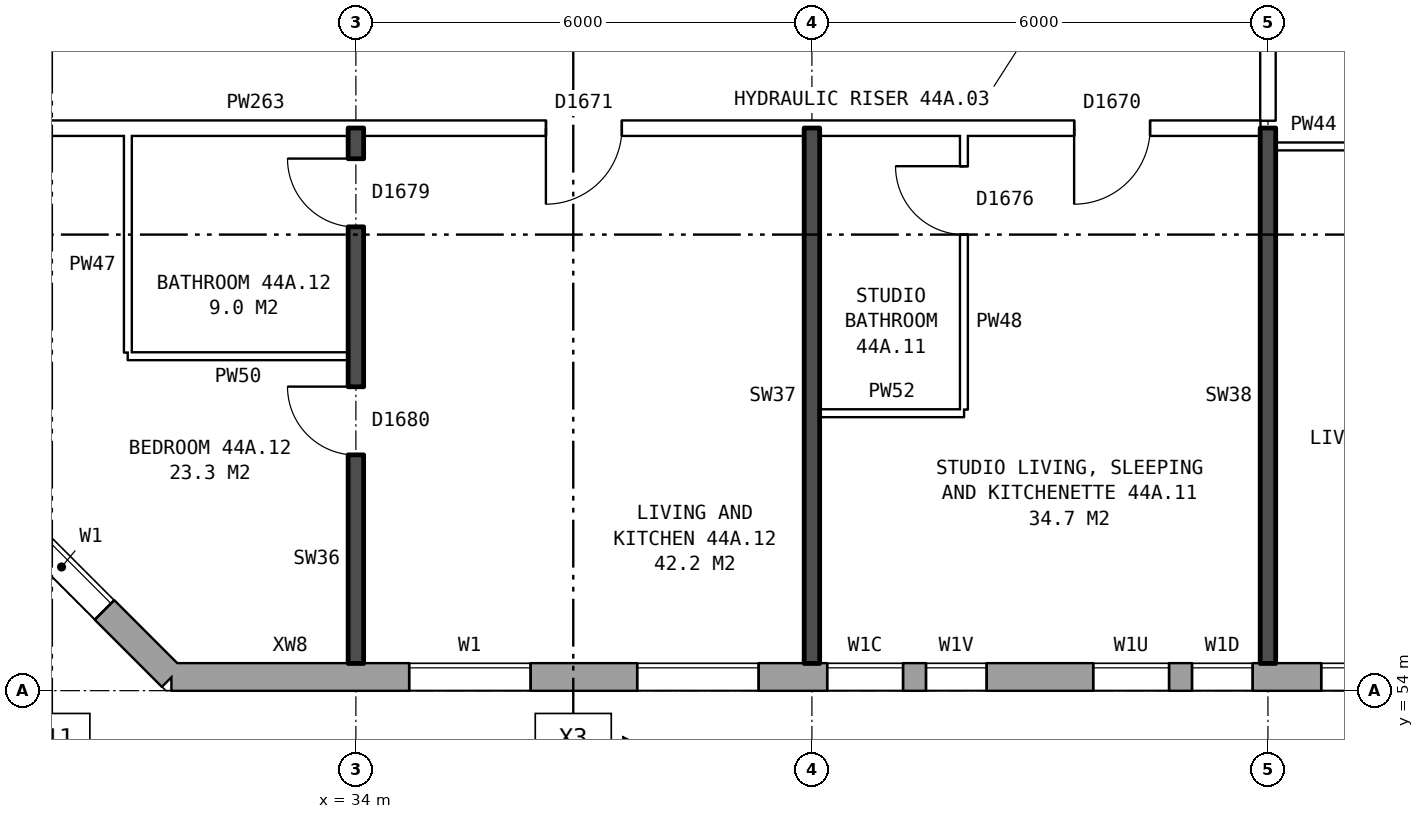
"""IFC4 building model, lengths in metres.
Left out: names, types, materials, properties, quantities, classifications, styles, units other than length and angle.
Written with IfcOpenShell. Run it as: python <this file> out.ifc"""

import sys

from ifc_helpers import new_model, si_unit, direction, frame, frame_2d, origin, place, context, subcontext, project, spatial, rectangle, extrude, element, fill, save


model = new_model("IFC4")
c1 = context("Model", 3, precision=1e-05, world=origin(), true_north=direction((0.0, 1.0)))
c2 = subcontext(c1, "Body", "Model", "MODEL_VIEW")
j1 = project(units=[si_unit("LENGTHUNIT", "METRE"), si_unit("PLANEANGLEUNIT", "RADIAN")], contexts=[c1])
p1 = place(None, origin())
s1 = spatial("IfcSite", under=j1, at=p1, CompositionType="ELEMENT")
p2 = place(p1, origin())
s2 = spatial("IfcBuilding", under=s1, at=p2, CompositionType="ELEMENT")
p3 = place(p2, frame((0.0, 0.0, 157.8)))
s3 = spatial("IfcBuildingStorey", under=s2, at=p3, CompositionType="ELEMENT", Elevation=157.8)
p4 = place(p3, frame((28.68, 57.075, 0.0), z_axis=(0.0, 0.0, 1.0), x_axis=(0.707106781187, -0.707106781187, 0.0)))
e1 = element("IfcWall", 1, at=p4, inside=s3, PredefinedType="STANDARD", context=c2, shape_type="SweptSolid", body=[
    extrude(rectangle(XDim=4.094, YDim=0.36, at=frame_2d((2.047, 0.0))), origin(), (0.0, 0.0, 1.0), 2.85),
])
p5 = place(p4, frame((1.247, 0.0, 0.8)))
e2 = element("IfcOpeningElement", 2, at=p5, cuts=e1, PredefinedType="OPENING", context=c2, shape_type="SweptSolid", body=[
    extrude(rectangle(XDim=1.6, YDim=1.8, at=frame_2d((0.8, 0.9))), frame((0.0, 0.19, 0.0), z_axis=(0.0, -1.0, 0.0), x_axis=(1.0, 0.0, 0.0)), (0.0, 0.0, 1.0), 0.38),
])
p6 = place(p3, frame((31.575, 54.18, 0.0), z_axis=(0.0, 0.0, 1.0), x_axis=(1.0, 0.0, 0.0)))
e3 = element("IfcWall", 3, at=p6, inside=s3, PredefinedType="STANDARD", context=c2, shape_type="SweptSolid", body=[
    extrude(rectangle(XDim=41.351, YDim=0.36, at=frame_2d((20.675, 0.0))), origin(), (0.0, 0.0, 1.0), 2.85),
])
p7 = place(p6, frame((3.125, 0.0, 0.8)))
e4 = element("IfcOpeningElement", 4, at=p7, cuts=e3, PredefinedType="OPENING", context=c2, shape_type="SweptSolid", body=[
    extrude(rectangle(XDim=1.6, YDim=1.8, at=frame_2d((0.8, 0.9))), frame((0.0, 0.19, 0.0), z_axis=(0.0, -1.0, 0.0), x_axis=(1.0, 0.0, 0.0)), (0.0, 0.0, 1.0), 0.38),
])
p8 = place(p6, frame((6.125, 0.0, 0.8)))
e5 = element("IfcOpeningElement", 5, at=p8, cuts=e3, PredefinedType="OPENING", context=c2, shape_type="SweptSolid", body=[
    extrude(rectangle(XDim=1.6, YDim=1.8, at=frame_2d((0.8, 0.9))), frame((0.0, 0.19, 0.0), z_axis=(0.0, -1.0, 0.0), x_axis=(1.0, 0.0, 0.0)), (0.0, 0.0, 1.0), 0.38),
])
p9 = place(p6, frame((8.625, 0.0, 0.8)))
e6 = element("IfcOpeningElement", 6, at=p9, cuts=e3, PredefinedType="OPENING", context=c2, shape_type="SweptSolid", body=[
    extrude(rectangle(XDim=1.0, YDim=1.8, at=frame_2d((0.5, 0.9))), frame((0.0, 0.19, 0.0), z_axis=(0.0, -1.0, 0.0), x_axis=(1.0, 0.0, 0.0)), (0.0, 0.0, 1.0), 0.38),
])
p10 = place(p6, frame((9.925, 0.0, 1.6)))
e7 = element("IfcOpeningElement", 7, at=p10, cuts=e3, PredefinedType="OPENING", context=c2, shape_type="SweptSolid", body=[
    extrude(rectangle(XDim=0.8, YDim=0.9, at=frame_2d((0.4, 0.45))), frame((0.0, 0.19, 0.0), z_axis=(0.0, -1.0, 0.0), x_axis=(1.0, 0.0, 0.0)), (0.0, 0.0, 1.0), 0.38),
])
p11 = place(p6, frame((15.125, 0.0, 0.8)))
e8 = element("IfcOpeningElement", 8, at=p11, cuts=e3, PredefinedType="OPENING", context=c2, shape_type="SweptSolid", body=[
    extrude(rectangle(XDim=1.6, YDim=1.8, at=frame_2d((0.8, 0.9))), frame((0.0, 0.19, 0.0), z_axis=(0.0, -1.0, 0.0), x_axis=(1.0, 0.0, 0.0)), (0.0, 0.0, 1.0), 0.38),
])
p12 = place(p6, frame((18.125, 0.0, 0.8)))
e9 = element("IfcOpeningElement", 9, at=p12, cuts=e3, PredefinedType="OPENING", context=c2, shape_type="SweptSolid", body=[
    extrude(rectangle(XDim=1.6, YDim=1.8, at=frame_2d((0.8, 0.9))), frame((0.0, 0.19, 0.0), z_axis=(0.0, -1.0, 0.0), x_axis=(1.0, 0.0, 0.0)), (0.0, 0.0, 1.0), 0.38),
])
p13 = place(p6, frame((21.125, 0.0, 0.8)))
e10 = element("IfcOpeningElement", 10, at=p13, cuts=e3, PredefinedType="OPENING", context=c2, shape_type="SweptSolid", body=[
    extrude(rectangle(XDim=1.6, YDim=1.8, at=frame_2d((0.8, 0.9))), frame((0.0, 0.19, 0.0), z_axis=(0.0, -1.0, 0.0), x_axis=(1.0, 0.0, 0.0)), (0.0, 0.0, 1.0), 0.38),
])
p14 = place(p6, frame((24.125, 0.0, 0.8)))
e11 = element("IfcOpeningElement", 11, at=p14, cuts=e3, PredefinedType="OPENING", context=c2, shape_type="SweptSolid", body=[
    extrude(rectangle(XDim=1.6, YDim=1.8, at=frame_2d((0.8, 0.9))), frame((0.0, 0.19, 0.0), z_axis=(0.0, -1.0, 0.0), x_axis=(1.0, 0.0, 0.0)), (0.0, 0.0, 1.0), 0.38),
])
p15 = place(p6, frame((26.625, 0.0, 0.8)))
e12 = element("IfcOpeningElement", 12, at=p15, cuts=e3, PredefinedType="OPENING", context=c2, shape_type="SweptSolid", body=[
    extrude(rectangle(XDim=1.4, YDim=1.8, at=frame_2d((0.7, 0.9))), frame((0.0, 0.19, 0.0), z_axis=(0.0, -1.0, 0.0), x_axis=(1.0, 0.0, 0.0)), (0.0, 0.0, 1.0), 0.38),
])
p16 = place(p6, frame((30.475, 0.0, 1.7)))
e13 = element("IfcOpeningElement", 13, at=p16, cuts=e3, PredefinedType="OPENING", context=c2, shape_type="SweptSolid", body=[
    extrude(rectangle(XDim=0.8, YDim=0.9, at=frame_2d((0.4, 0.45))), frame((0.0, 0.19, 0.0), z_axis=(0.0, -1.0, 0.0), x_axis=(1.0, 0.0, 0.0)), (0.0, 0.0, 1.0), 0.38),
])
p17 = place(p6, frame((33.125, 0.0, 0.8)))
e14 = element("IfcOpeningElement", 14, at=p17, cuts=e3, PredefinedType="OPENING", context=c2, shape_type="SweptSolid", body=[
    extrude(rectangle(XDim=1.6, YDim=1.8, at=frame_2d((0.8, 0.9))), frame((0.0, 0.19, 0.0), z_axis=(0.0, -1.0, 0.0), x_axis=(1.0, 0.0, 0.0)), (0.0, 0.0, 1.0), 0.38),
])
p18 = place(p6, frame((36.125, 0.0, 0.8)))
e15 = element("IfcOpeningElement", 15, at=p18, cuts=e3, PredefinedType="OPENING", context=c2, shape_type="SweptSolid", body=[
    extrude(rectangle(XDim=1.6, YDim=1.8, at=frame_2d((0.8, 0.9))), frame((0.0, 0.19, 0.0), z_axis=(0.0, -1.0, 0.0), x_axis=(1.0, 0.0, 0.0)), (0.0, 0.0, 1.0), 0.38),
])
p19 = place(p6, frame((39.125, 0.0, 0.8)))
e16 = element("IfcOpeningElement", 16, at=p19, cuts=e3, PredefinedType="OPENING", context=c2, shape_type="SweptSolid", body=[
    extrude(rectangle(XDim=1.6, YDim=1.8, at=frame_2d((0.8, 0.9))), frame((0.0, 0.19, 0.0), z_axis=(0.0, -1.0, 0.0), x_axis=(1.0, 0.0, 0.0)), (0.0, 0.0, 1.0), 0.38),
])
p20 = place(p6, frame((12.125, 0.0, 0.8)))
e17 = element("IfcOpeningElement", 17, at=p20, cuts=e3, PredefinedType="OPENING", context=c2, shape_type="SweptSolid", body=[
    extrude(rectangle(XDim=1.0, YDim=0.9, at=frame_2d((0.5, 0.45))), frame((0.0, 0.19, 0.0), z_axis=(0.0, -1.0, 0.0), x_axis=(1.0, 0.0, 0.0)), (0.0, 0.0, 1.0), 0.38),
])
p21 = place(p6, frame((13.425, 0.0, 0.8)))
e18 = element("IfcOpeningElement", 18, at=p21, cuts=e3, PredefinedType="OPENING", context=c2, shape_type="SweptSolid", body=[
    extrude(rectangle(XDim=0.8, YDim=1.8, at=frame_2d((0.4, 0.9))), frame((0.0, 0.19, 0.0), z_axis=(0.0, -1.0, 0.0), x_axis=(1.0, 0.0, 0.0)), (0.0, 0.0, 1.0), 0.38),
])
p22 = place(p6, frame((28.325, 0.0, 0.8)))
e19 = element("IfcOpeningElement", 19, at=p22, cuts=e3, PredefinedType="OPENING", context=c2, shape_type="SweptSolid", body=[
    extrude(rectangle(XDim=0.8, YDim=0.9, at=frame_2d((0.4, 0.45))), frame((0.0, 0.19, 0.0), z_axis=(0.0, -1.0, 0.0), x_axis=(1.0, 0.0, 0.0)), (0.0, 0.0, 1.0), 0.38),
])
p23 = place(p6, frame((31.625, 0.0, 0.8)))
e20 = element("IfcOpeningElement", 20, at=p23, cuts=e3, PredefinedType="OPENING", context=c2, shape_type="SweptSolid", body=[
    extrude(rectangle(XDim=0.6, YDim=1.8, at=frame_2d((0.3, 0.9))), frame((0.0, 0.19, 0.0), z_axis=(0.0, -1.0, 0.0), x_axis=(1.0, 0.0, 0.0)), (0.0, 0.0, 1.0), 0.38),
])
p24 = place(p3, frame((40.1, 57.65, 0.0), z_axis=(0.0, 0.0, 1.0), x_axis=(1.0, 0.0, 0.0)))
e21 = element("IfcWall", 21, at=p24, inside=s3, PredefinedType="PARTITIONING", context=c2, shape_type="SweptSolid", body=[
    extrude(rectangle(XDim=1.9, YDim=0.1, at=frame_2d((0.95, 0.0))), origin(), (0.0, 0.0, 1.0), 2.85),
])
p25 = place(p3, frame((31.0, 58.4, 0.0), z_axis=(0.0, 0.0, 1.0), x_axis=(1.0, 0.0, 0.0)))
e22 = element("IfcWall", 22, at=p25, inside=s3, PredefinedType="PARTITIONING", context=c2, shape_type="SweptSolid", body=[
    extrude(rectangle(XDim=2.9, YDim=0.1, at=frame_2d((1.45, 0.0))), origin(), (0.0, 0.0, 1.0), 2.85),
])
p26 = place(p3, frame((46.1, 61.16, 0.0), z_axis=(0.0, 0.0, 1.0), x_axis=(1.0, 0.0, 0.0)))
e23 = element("IfcWall", 23, at=p26, inside=s3, PredefinedType="PARTITIONING", context=c2, shape_type="SweptSolid", body=[
    extrude(rectangle(XDim=2.9, YDim=0.1, at=frame_2d((1.45, 0.0))), origin(), (0.0, 0.0, 1.0), 2.85),
])
p27 = place(p26, frame((1.0, 0.0, 0.0)))
e24 = element("IfcOpeningElement", 24, at=p27, cuts=e23, PredefinedType="OPENING", context=c2, shape_type="SweptSolid", body=[
    extrude(rectangle(XDim=0.9, YDim=2.1, at=frame_2d((0.45, 1.05))), frame((0.0, 0.06, 0.0), z_axis=(0.0, -1.0, 0.0), x_axis=(1.0, 0.0, 0.0)), (0.0, 0.0, 1.0), 0.12),
])
p28 = place(p3, frame((28.86, 61.4, 0.0), z_axis=(0.0, 0.0, 1.0), x_axis=(1.0, 0.0, 0.0)))
e25 = element("IfcWall", 25, at=p28, inside=s3, PredefinedType="PARTITIONING", context=c2, shape_type="SweptSolid", body=[
    extrude(rectangle(XDim=17.04, YDim=0.2, at=frame_2d((8.52, 0.0))), origin(), (0.0, 0.0, 1.0), 2.85),
])
p29 = place(p28, frame((14.59, 0.0, 0.0)))
e26 = element("IfcOpeningElement", 26, at=p29, cuts=e25, PredefinedType="OPENING", context=c2, shape_type="SweptSolid", body=[
    extrude(rectangle(XDim=1.0, YDim=2.1, at=frame_2d((0.5, 1.05))), frame((0.0, 0.11, 0.0), z_axis=(0.0, -1.0, 0.0), x_axis=(1.0, 0.0, 0.0)), (0.0, 0.0, 1.0), 0.22),
])
p30 = place(p28, frame((7.64, 0.0, 0.0)))
e27 = element("IfcOpeningElement", 27, at=p30, cuts=e25, PredefinedType="OPENING", context=c2, shape_type="SweptSolid", body=[
    extrude(rectangle(XDim=1.0, YDim=2.1, at=frame_2d((0.5, 1.05))), frame((0.0, 0.11, 0.0), z_axis=(0.0, -1.0, 0.0), x_axis=(1.0, 0.0, 0.0)), (0.0, 0.0, 1.0), 0.22),
])
p31 = place(p3, frame((31.0, 58.45, 0.0), z_axis=(0.0, 0.0, 1.0), x_axis=(0.0, 1.0, 0.0)))
e28 = element("IfcWall", 28, at=p31, inside=s3, PredefinedType="PARTITIONING", context=c2, shape_type="SweptSolid", body=[
    extrude(rectangle(XDim=2.85, YDim=0.1, at=frame_2d((1.425, 0.0))), origin(), (0.0, 0.0, 1.0), 2.85),
])
p32 = place(p3, frame((34.0, 54.36, 0.0), z_axis=(0.0, 0.0, 1.0), x_axis=(0.0, 1.0, 0.0)))
e29 = element("IfcWall", 29, at=p32, inside=s3, PredefinedType="SOLIDWALL", context=c2, shape_type="SweptSolid", body=[
    extrude(rectangle(XDim=7.04, YDim=0.2, at=frame_2d((3.52, 0.0))), origin(), (0.0, 0.0, 1.0), 2.85),
])
p33 = place(p32, frame((2.74, 0.0, 0.0)))
e30 = element("IfcOpeningElement", 30, at=p33, cuts=e29, PredefinedType="OPENING", context=c2, shape_type="SweptSolid", body=[
    extrude(rectangle(XDim=0.9, YDim=2.1, at=frame_2d((0.45, 1.05))), frame((0.0, 0.11, 0.0), z_axis=(0.0, -1.0, 0.0), x_axis=(1.0, 0.0, 0.0)), (0.0, 0.0, 1.0), 0.22),
])
p34 = place(p32, frame((5.74, 0.0, 0.0)))
e31 = element("IfcOpeningElement", 31, at=p34, cuts=e29, PredefinedType="OPENING", context=c2, shape_type="SweptSolid", body=[
    extrude(rectangle(XDim=0.9, YDim=2.1, at=frame_2d((0.45, 1.05))), frame((0.0, 0.11, 0.0), z_axis=(0.0, -1.0, 0.0), x_axis=(1.0, 0.0, 0.0)), (0.0, 0.0, 1.0), 0.22),
])
p35 = place(p3, frame((40.0, 54.36, 0.0), z_axis=(0.0, 0.0, 1.0), x_axis=(0.0, 1.0, 0.0)))
e32 = element("IfcWall", 32, at=p35, inside=s3, PredefinedType="SOLIDWALL", context=c2, shape_type="SweptSolid", body=[
    extrude(rectangle(XDim=7.04, YDim=0.2, at=frame_2d((3.52, 0.0))), origin(), (0.0, 0.0, 1.0), 2.85),
])
p36 = place(p3, frame((42.0, 57.7, 0.0), z_axis=(0.0, 0.0, 1.0), x_axis=(0.0, 1.0, 0.0)))
e33 = element("IfcWall", 33, at=p36, inside=s3, PredefinedType="PARTITIONING", context=c2, shape_type="SweptSolid", body=[
    extrude(rectangle(XDim=3.6, YDim=0.1, at=frame_2d((1.8, 0.0))), origin(), (0.0, 0.0, 1.0), 2.85),
])
p37 = place(p36, frame((2.3, 0.0, 0.0)))
e34 = element("IfcOpeningElement", 34, at=p37, cuts=e33, PredefinedType="OPENING", context=c2, shape_type="SweptSolid", body=[
    extrude(rectangle(XDim=0.9, YDim=2.1, at=frame_2d((0.45, 1.05))), frame((0.0, 0.06, 0.0), z_axis=(0.0, -1.0, 0.0), x_axis=(1.0, 0.0, 0.0)), (0.0, 0.0, 1.0), 0.12),
])
p38 = place(p3, frame((46.0, 54.36, 0.0), z_axis=(0.0, 0.0, 1.0), x_axis=(0.0, 1.0, 0.0)))
e35 = element("IfcWall", 35, at=p38, inside=s3, PredefinedType="SOLIDWALL", context=c2, shape_type="SweptSolid", body=[
    extrude(rectangle(XDim=7.04, YDim=0.2, at=frame_2d((3.52, 0.0))), origin(), (0.0, 0.0, 1.0), 2.85),
])
p39 = place(p3, frame((46.0, 61.5, 0.0), z_axis=(0.0, 0.0, 1.0), x_axis=(0.0, 1.0, 0.0)))
e36 = element("IfcWall", 36, at=p39, inside=s3, PredefinedType="PARTITIONING", context=c2, shape_type="SweptSolid", body=[
    extrude(rectangle(XDim=2.2, YDim=0.2, at=frame_2d((1.1, 0.0))), origin(), (0.0, 0.0, 1.0), 2.85),
])
p40 = place(p5, origin())
e37 = element("IfcWindow", 37, at=p40, inside=s3, PartitioningType="SINGLE_PANEL", PredefinedType="WINDOW", context=c2, shape_type="SweptSolid", body=[
    extrude(rectangle(XDim=1.6, YDim=1.8, at=frame_2d((0.8, 0.9))), frame((0.0, 0.15, 0.0), z_axis=(0.0, -1.0, 0.0), x_axis=(1.0, 0.0, 0.0)), (0.0, 0.0, 1.0), 0.06),
])
fill(e2, e37)
p41 = place(p7, origin())
e38 = element("IfcWindow", 38, at=p41, inside=s3, PartitioningType="SINGLE_PANEL", PredefinedType="WINDOW", context=c2, shape_type="SweptSolid", body=[
    extrude(rectangle(XDim=1.6, YDim=1.8, at=frame_2d((0.8, 0.9))), frame((0.0, 0.15, 0.0), z_axis=(0.0, -1.0, 0.0), x_axis=(1.0, 0.0, 0.0)), (0.0, 0.0, 1.0), 0.06),
])
fill(e4, e38)
p42 = place(p8, origin())
e39 = element("IfcWindow", 39, at=p42, inside=s3, PartitioningType="SINGLE_PANEL", PredefinedType="WINDOW", context=c2, shape_type="SweptSolid", body=[
    extrude(rectangle(XDim=1.6, YDim=1.8, at=frame_2d((0.8, 0.9))), frame((0.0, 0.15, 0.0), z_axis=(0.0, -1.0, 0.0), x_axis=(1.0, 0.0, 0.0)), (0.0, 0.0, 1.0), 0.06),
])
fill(e5, e39)
p43 = place(p9, origin())
e40 = element("IfcWindow", 40, at=p43, inside=s3, PartitioningType="SINGLE_PANEL", PredefinedType="WINDOW", context=c2, shape_type="SweptSolid", body=[
    extrude(rectangle(XDim=1.0, YDim=1.8, at=frame_2d((0.5, 0.9))), frame((0.0, 0.15, 0.0), z_axis=(0.0, -1.0, 0.0), x_axis=(1.0, 0.0, 0.0)), (0.0, 0.0, 1.0), 0.06),
])
fill(e6, e40)
p44 = place(p10, origin())
e41 = element("IfcWindow", 41, at=p44, inside=s3, PartitioningType="SINGLE_PANEL", PredefinedType="WINDOW", context=c2, shape_type="SweptSolid", body=[
    extrude(rectangle(XDim=0.8, YDim=0.9, at=frame_2d((0.4, 0.45))), frame((0.0, 0.15, 0.0), z_axis=(0.0, -1.0, 0.0), x_axis=(1.0, 0.0, 0.0)), (0.0, 0.0, 1.0), 0.06),
])
fill(e7, e41)
p45 = place(p11, origin())
e42 = element("IfcWindow", 42, at=p45, inside=s3, PartitioningType="SINGLE_PANEL", PredefinedType="WINDOW", context=c2, shape_type="SweptSolid", body=[
    extrude(rectangle(XDim=1.6, YDim=1.8, at=frame_2d((0.8, 0.9))), frame((0.0, 0.15, 0.0), z_axis=(0.0, -1.0, 0.0), x_axis=(1.0, 0.0, 0.0)), (0.0, 0.0, 1.0), 0.06),
])
fill(e8, e42)
p46 = place(p29, frame((1.0, 0.0, 0.0), z_axis=(0.0, 0.0, 1.0), x_axis=(-1.0, 0.0, 0.0)))
e43 = element("IfcDoor", 43, at=p46, inside=s3, OperationType="SINGLE_SWING_RIGHT", PredefinedType="DOOR", context=c2, shape_type="SweptSolid", body=[
    extrude(rectangle(XDim=1.0, YDim=2.1, at=frame_2d((0.5, 1.05))), frame((0.0, 0.025, 0.0), z_axis=(0.0, -1.0, 0.0), x_axis=(1.0, 0.0, 0.0)), (0.0, 0.0, 1.0), 0.05),
])
fill(e26, e43)
p47 = place(p37, origin())
e44 = element("IfcDoor", 44, at=p47, inside=s3, OperationType="SINGLE_SWING_RIGHT", PredefinedType="DOOR", context=c2, shape_type="SweptSolid", body=[
    extrude(rectangle(XDim=0.9, YDim=2.1, at=frame_2d((0.45, 1.05))), frame((0.0, 0.025, 0.0), z_axis=(0.0, -1.0, 0.0), x_axis=(1.0, 0.0, 0.0)), (0.0, 0.0, 1.0), 0.05),
])
fill(e34, e44)
p48 = place(p33, origin())
e45 = element("IfcDoor", 45, at=p48, inside=s3, OperationType="SINGLE_SWING_RIGHT", PredefinedType="DOOR", context=c2, shape_type="SweptSolid", body=[
    extrude(rectangle(XDim=0.9, YDim=2.1, at=frame_2d((0.45, 1.05))), frame((0.0, 0.025, 0.0), z_axis=(0.0, -1.0, 0.0), x_axis=(1.0, 0.0, 0.0)), (0.0, 0.0, 1.0), 0.05),
])
fill(e30, e45)
p49 = place(p30, frame((1.0, 0.0, 0.0), z_axis=(0.0, 0.0, 1.0), x_axis=(-1.0, 0.0, 0.0)))
e46 = element("IfcDoor", 46, at=p49, inside=s3, OperationType="SINGLE_SWING_RIGHT", PredefinedType="DOOR", context=c2, shape_type="SweptSolid", body=[
    extrude(rectangle(XDim=1.0, YDim=2.1, at=frame_2d((0.5, 1.05))), frame((0.0, 0.025, 0.0), z_axis=(0.0, -1.0, 0.0), x_axis=(1.0, 0.0, 0.0)), (0.0, 0.0, 1.0), 0.05),
])
fill(e27, e46)
p50 = place(p34, origin())
e47 = element("IfcDoor", 47, at=p50, inside=s3, OperationType="SINGLE_SWING_RIGHT", PredefinedType="DOOR", context=c2, shape_type="SweptSolid", body=[
    extrude(rectangle(XDim=0.9, YDim=2.1, at=frame_2d((0.45, 1.05))), frame((0.0, 0.025, 0.0), z_axis=(0.0, -1.0, 0.0), x_axis=(1.0, 0.0, 0.0)), (0.0, 0.0, 1.0), 0.05),
])
fill(e31, e47)
p51 = place(p20, origin())
e48 = element("IfcWindow", 48, at=p51, inside=s3, PartitioningType="SINGLE_PANEL", PredefinedType="WINDOW", context=c2, shape_type="SweptSolid", body=[
    extrude(rectangle(XDim=1.0, YDim=0.9, at=frame_2d((0.5, 0.45))), frame((0.0, 0.15, 0.0), z_axis=(0.0, -1.0, 0.0), x_axis=(1.0, 0.0, 0.0)), (0.0, 0.0, 1.0), 0.06),
])
fill(e17, e48)
p52 = place(p21, origin())
e49 = element("IfcWindow", 49, at=p52, inside=s3, PartitioningType="SINGLE_PANEL", PredefinedType="WINDOW", context=c2, shape_type="SweptSolid", body=[
    extrude(rectangle(XDim=0.8, YDim=1.8, at=frame_2d((0.4, 0.9))), frame((0.0, 0.15, 0.0), z_axis=(0.0, -1.0, 0.0), x_axis=(1.0, 0.0, 0.0)), (0.0, 0.0, 1.0), 0.06),
])
fill(e18, e49)
save(model, sys.argv[1])
